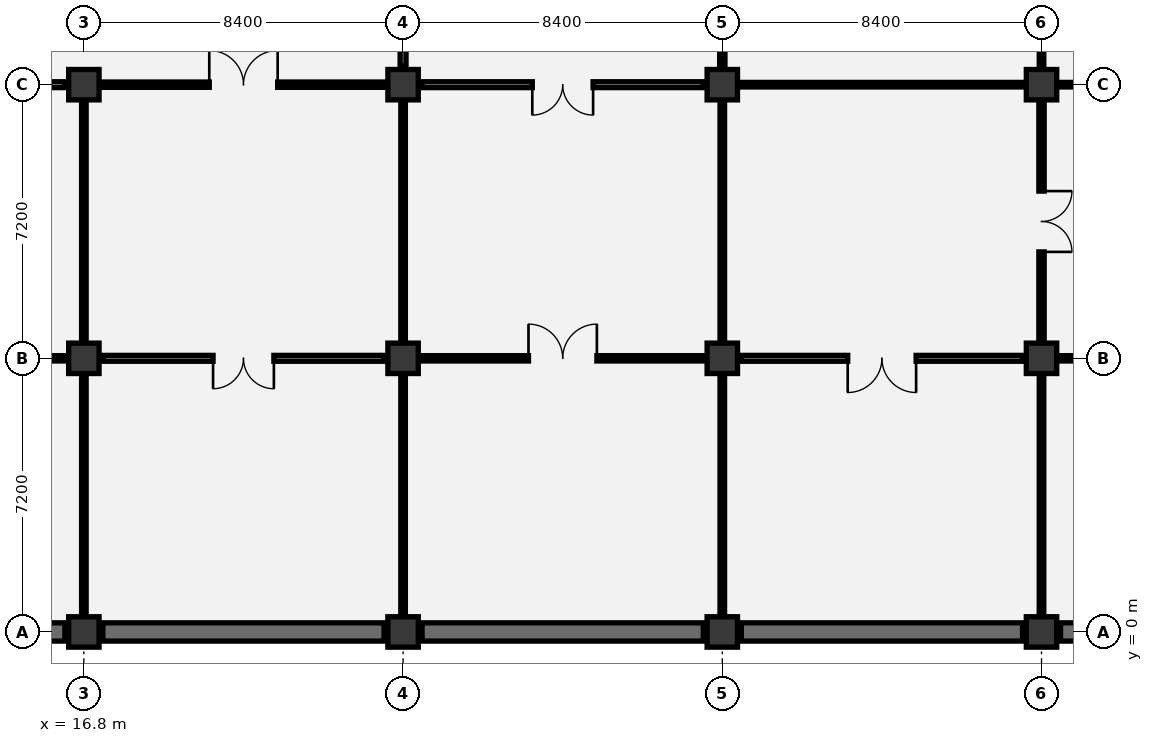
"""IFC4 building model, lengths in metres.
Left out: names, types, materials, properties, quantities, classifications, styles, units other than length and angle.
Written with IfcOpenShell. Run it as: python <this file> out.ifc"""

import sys

from ifc_helpers import new_model, si_unit, direction, frame, frame_2d, origin, origin_2d, place, context, subcontext, project, spatial, rectangle, extrude, element, fill, save


model = new_model("IFC4")
c1 = context("Model", 3, precision=1e-05, world=origin(), true_north=direction((0.0, 1.0)))
c2 = subcontext(c1, "Body", "Model", "MODEL_VIEW")
j1 = project(units=[si_unit("LENGTHUNIT", "METRE"), si_unit("PLANEANGLEUNIT", "RADIAN")], contexts=[c1])
p1 = place(None, origin())
s1 = spatial("IfcSite", under=j1, at=p1, CompositionType="ELEMENT")
p2 = place(p1, origin())
s2 = spatial("IfcBuilding", under=s1, at=p2, CompositionType="ELEMENT")
p3 = place(p2, frame((0.0, 0.0, -4.8)))
s3 = spatial("IfcBuildingStorey", under=s2, at=p3, CompositionType="ELEMENT", Elevation=-4.8)
for number, where, z_axis, x_axis in (
    (1, (16.8, 0.0, 0.0), (0.0, 0.0, 1.0), (1.0, 0.0, 0.0)),
    (2, (16.8, 7.2, 0.0), (0.0, 0.0, 1.0), (1.0, 0.0, 0.0)),
    (3, (16.8, 14.4, 0.0), (0.0, 0.0, 1.0), (1.0, 0.0, 0.0)),
    (4, (25.2, 0.0, 0.0), (0.0, 0.0, 1.0), (1.0, 0.0, 0.0)),
    (5, (25.2, 7.2, 0.0), (0.0, 0.0, 1.0), (1.0, 0.0, 0.0)),
    (6, (25.2, 14.4, 0.0), (0.0, 0.0, 1.0), (1.0, 0.0, 0.0)),
    (7, (33.6, 0.0, 0.0), (0.0, 0.0, 1.0), (1.0, 0.0, 0.0)),
    (8, (33.6, 7.2, 0.0), (0.0, 0.0, 1.0), (1.0, 0.0, 0.0)),
    (9, (33.6, 14.4, 0.0), (0.0, 0.0, 1.0), (1.0, 0.0, 0.0)),
    (10, (42.0, 0.0, 0.0), (0.0, 0.0, 1.0), (1.0, 0.0, 0.0)),
    (11, (42.0, 7.2, 0.0), (0.0, 0.0, 1.0), (1.0, 0.0, 0.0)),
    (12, (42.0, 14.4, 0.0), (0.0, 0.0, 1.0), (1.0, 0.0, 0.0)),
):
    element("IfcColumn", number, at=place(p3, frame(where, z_axis=z_axis, x_axis=x_axis)), inside=s3, PredefinedType="COLUMN", context=c2, shape_type="SweptSolid", body=[
        extrude(rectangle(XDim=0.8, YDim=0.8, at=origin_2d()), origin(), (0.0, 0.0, 1.0), 4.8),
    ])
p4 = place(p3, frame((8.9, 0.0, 0.0), z_axis=(0.0, 0.0, 1.0), x_axis=(1.0, 0.0, 0.0)))
e13 = element("IfcWall", 13, at=p4, inside=s3, PredefinedType="USERDEFINED", context=c2, shape_type="SweptSolid", body=[
    extrude(rectangle(XDim=7.4, YDim=0.48, at=frame_2d((3.7, 0.0))), origin(), (0.0, 0.0, 1.0), 4.45),
])
p5 = place(p3, frame((17.3, 0.0, 0.0), z_axis=(0.0, 0.0, 1.0), x_axis=(1.0, 0.0, 0.0)))
e14 = element("IfcWall", 14, at=p5, inside=s3, PredefinedType="USERDEFINED", context=c2, shape_type="SweptSolid", body=[
    extrude(rectangle(XDim=7.4, YDim=0.48, at=frame_2d((3.7, 0.0))), origin(), (0.0, 0.0, 1.0), 4.45),
])
p6 = place(p3, frame((25.7, 0.0, 0.0), z_axis=(0.0, 0.0, 1.0), x_axis=(1.0, 0.0, 0.0)))
e15 = element("IfcWall", 15, at=p6, inside=s3, PredefinedType="USERDEFINED", context=c2, shape_type="SweptSolid", body=[
    extrude(rectangle(XDim=7.4, YDim=0.48, at=frame_2d((3.7, 0.0))), origin(), (0.0, 0.0, 1.0), 4.45),
])
for number, where, z_axis, x_axis in (
    (16, (34.1, 0.0, 0.0), (0.0, 0.0, 1.0), (1.0, 0.0, 0.0)),
    (17, (42.5, 0.0, 0.0), (0.0, 0.0, 1.0), (1.0, 0.0, 0.0)),
):
    element("IfcWall", number, at=place(p3, frame(where, z_axis=z_axis, x_axis=x_axis)), inside=s3, PredefinedType="USERDEFINED", context=c2, shape_type="SweptSolid", body=[
        extrude(rectangle(XDim=7.4, YDim=0.48, at=frame_2d((3.7, 0.0))), origin(), (0.0, 0.0, 1.0), 4.45),
    ])
p7 = place(p3, frame((16.8, 0.5, 0.0), z_axis=(0.0, 0.0, 1.0), x_axis=(0.0, 1.0, 0.0)))
e18 = element("IfcWall", 18, at=p7, inside=s3, PredefinedType="PARTITIONING", context=c2, shape_type="SweptSolid", body=[
    extrude(rectangle(XDim=6.2, YDim=0.12, at=frame_2d((3.1, 0.0))), origin(), (0.0, 0.0, 1.0), 3.645),
])
p8 = place(p3, frame((8.9, 7.2, 0.0), z_axis=(0.0, 0.0, 1.0), x_axis=(1.0, 0.0, 0.0)))
e19 = element("IfcWall", 19, at=p8, inside=s3, PredefinedType="PARTITIONING", context=c2, shape_type="SweptSolid", body=[
    extrude(rectangle(XDim=7.4, YDim=0.14, at=frame_2d((3.7, 0.0))), origin(), (0.0, 0.0, 1.0), 3.545),
])
p9 = place(p8, frame((2.8, 0.0, 0.0)))
e20 = element("IfcOpeningElement", 20, at=p9, cuts=e19, PredefinedType="OPENING", context=c2, shape_type="SweptSolid", body=[
    extrude(rectangle(XDim=1.8, YDim=2.25, at=frame_2d((0.9, 1.125))), frame((0.0, 0.08, 0.0), z_axis=(0.0, -1.0, 0.0), x_axis=(1.0, 0.0, 0.0)), (0.0, 0.0, 1.0), 0.16),
])
p10 = place(p3, frame((16.8, 7.7, 0.0), z_axis=(0.0, 0.0, 1.0), x_axis=(0.0, 1.0, 0.0)))
e21 = element("IfcWall", 21, at=p10, inside=s3, PredefinedType="PARTITIONING", context=c2, shape_type="SweptSolid", body=[
    extrude(rectangle(XDim=6.2, YDim=0.12, at=frame_2d((3.1, 0.0))), origin(), (0.0, 0.0, 1.0), 3.645),
])
p11 = place(p3, frame((8.9, 14.4, 0.0), z_axis=(0.0, 0.0, 1.0), x_axis=(1.0, 0.0, 0.0)))
e22 = element("IfcWall", 22, at=p11, inside=s3, PredefinedType="PARTITIONING", context=c2, shape_type="SweptSolid", body=[
    extrude(rectangle(XDim=7.4, YDim=0.155, at=frame_2d((3.7, 0.0))), origin(), (0.0, 0.0, 1.0), 3.545),
])
p12 = place(p11, frame((2.9, 0.0, 0.0)))
e23 = element("IfcOpeningElement", 23, at=p12, cuts=e22, PredefinedType="OPENING", context=c2, shape_type="SweptSolid", body=[
    extrude(rectangle(XDim=1.6, YDim=2.2, at=frame_2d((0.8, 1.1))), frame((0.0, 0.087, 0.0), z_axis=(0.0, -1.0, 0.0), x_axis=(1.0, 0.0, 0.0)), (0.0, 0.0, 1.0), 0.175),
])
p13 = place(p3, frame((25.2, 0.5, 0.0), z_axis=(0.0, 0.0, 1.0), x_axis=(0.0, 1.0, 0.0)))
e24 = element("IfcWall", 24, at=p13, inside=s3, PredefinedType="PARTITIONING", context=c2, shape_type="SweptSolid", body=[
    extrude(rectangle(XDim=6.2, YDim=0.12, at=frame_2d((3.1, 0.0))), origin(), (0.0, 0.0, 1.0), 3.645),
])
p14 = place(p3, frame((17.3, 7.2, 0.0), z_axis=(0.0, 0.0, 1.0), x_axis=(1.0, 0.0, 0.0)))
e25 = element("IfcWall", 25, at=p14, inside=s3, PredefinedType="PARTITIONING", context=c2, shape_type="SweptSolid", body=[
    extrude(rectangle(XDim=7.4, YDim=0.155, at=frame_2d((3.7, 0.0))), origin(), (0.0, 0.0, 1.0), 3.545),
])
p15 = place(p14, frame((2.9, 0.0, 0.0)))
e26 = element("IfcOpeningElement", 26, at=p15, cuts=e25, PredefinedType="OPENING", context=c2, shape_type="SweptSolid", body=[
    extrude(rectangle(XDim=1.6, YDim=2.2, at=frame_2d((0.8, 1.1))), frame((0.0, 0.087, 0.0), z_axis=(0.0, -1.0, 0.0), x_axis=(1.0, 0.0, 0.0)), (0.0, 0.0, 1.0), 0.175),
])
p16 = place(p3, frame((25.2, 7.7, 0.0), z_axis=(0.0, 0.0, 1.0), x_axis=(0.0, 1.0, 0.0)))
e27 = element("IfcWall", 27, at=p16, inside=s3, PredefinedType="PARTITIONING", context=c2, shape_type="SweptSolid", body=[
    extrude(rectangle(XDim=6.2, YDim=0.12, at=frame_2d((3.1, 0.0))), origin(), (0.0, 0.0, 1.0), 3.645),
])
p17 = place(p3, frame((17.3, 14.4, 0.0), z_axis=(0.0, 0.0, 1.0), x_axis=(1.0, 0.0, 0.0)))
e28 = element("IfcWall", 28, at=p17, inside=s3, PredefinedType="PARTITIONING", context=c2, shape_type="SweptSolid", body=[
    extrude(rectangle(XDim=7.4, YDim=0.14, at=frame_2d((3.7, 0.0))), origin(), (0.0, 0.0, 1.0), 3.545),
])
p18 = place(p17, frame((2.8, 0.0, 0.0)))
e29 = element("IfcOpeningElement", 29, at=p18, cuts=e28, PredefinedType="OPENING", context=c2, shape_type="SweptSolid", body=[
    extrude(rectangle(XDim=1.8, YDim=2.25, at=frame_2d((0.9, 1.125))), frame((0.0, 0.08, 0.0), z_axis=(0.0, -1.0, 0.0), x_axis=(1.0, 0.0, 0.0)), (0.0, 0.0, 1.0), 0.16),
])
p19 = place(p3, frame((25.2, 14.9, 0.0), z_axis=(0.0, 0.0, 1.0), x_axis=(0.0, 1.0, 0.0)))
e30 = element("IfcWall", 30, at=p19, inside=s3, PredefinedType="PARTITIONING", context=c2, shape_type="SweptSolid", body=[
    extrude(rectangle(XDim=6.2, YDim=0.155, at=frame_2d((3.1, 0.0))), origin(), (0.0, 0.0, 1.0), 3.645),
])
p20 = place(p19, frame((2.3, 0.0, 0.0)))
e31 = element("IfcOpeningElement", 31, at=p20, cuts=e30, PredefinedType="OPENING", context=c2, shape_type="SweptSolid", body=[
    extrude(rectangle(XDim=1.6, YDim=2.2, at=frame_2d((0.8, 1.1))), frame((0.0, 0.087, 0.0), z_axis=(0.0, -1.0, 0.0), x_axis=(1.0, 0.0, 0.0)), (0.0, 0.0, 1.0), 0.175),
])
p21 = place(p3, frame((33.6, 0.5, 0.0), z_axis=(0.0, 0.0, 1.0), x_axis=(0.0, 1.0, 0.0)))
e32 = element("IfcWall", 32, at=p21, inside=s3, PredefinedType="PARTITIONING", context=c2, shape_type="SweptSolid", body=[
    extrude(rectangle(XDim=6.2, YDim=0.12, at=frame_2d((3.1, 0.0))), origin(), (0.0, 0.0, 1.0), 3.645),
])
p22 = place(p3, frame((25.7, 7.2, 0.0), z_axis=(0.0, 0.0, 1.0), x_axis=(1.0, 0.0, 0.0)))
e33 = element("IfcWall", 33, at=p22, inside=s3, PredefinedType="PARTITIONING", context=c2, shape_type="SweptSolid", body=[
    extrude(rectangle(XDim=7.4, YDim=0.14, at=frame_2d((3.7, 0.0))), origin(), (0.0, 0.0, 1.0), 3.545),
])
p23 = place(p22, frame((2.8, 0.0, 0.0)))
e34 = element("IfcOpeningElement", 34, at=p23, cuts=e33, PredefinedType="OPENING", context=c2, shape_type="SweptSolid", body=[
    extrude(rectangle(XDim=1.8, YDim=2.25, at=frame_2d((0.9, 1.125))), frame((0.0, 0.08, 0.0), z_axis=(0.0, -1.0, 0.0), x_axis=(1.0, 0.0, 0.0)), (0.0, 0.0, 1.0), 0.16),
])
p24 = place(p3, frame((33.6, 7.7, 0.0), z_axis=(0.0, 0.0, 1.0), x_axis=(0.0, 1.0, 0.0)))
e35 = element("IfcWall", 35, at=p24, inside=s3, PredefinedType="PARTITIONING", context=c2, shape_type="SweptSolid", body=[
    extrude(rectangle(XDim=6.2, YDim=0.12, at=frame_2d((3.1, 0.0))), origin(), (0.0, 0.0, 1.0), 3.645),
])
p25 = place(p3, frame((25.7, 14.4, 0.0), z_axis=(0.0, 0.0, 1.0), x_axis=(1.0, 0.0, 0.0)))
e36 = element("IfcWall", 36, at=p25, inside=s3, PredefinedType="PARTITIONING", context=c2, shape_type="SweptSolid", body=[
    extrude(rectangle(XDim=7.4, YDim=0.155, at=frame_2d((3.7, 0.0))), origin(), (0.0, 0.0, 1.0), 3.545),
])
p26 = place(p25, frame((2.9, 0.0, 0.0)))
e37 = element("IfcOpeningElement", 37, at=p26, cuts=e36, PredefinedType="OPENING", context=c2, shape_type="SweptSolid", body=[
    extrude(rectangle(XDim=1.6, YDim=2.2, at=frame_2d((0.8, 1.1))), frame((0.0, 0.087, 0.0), z_axis=(0.0, -1.0, 0.0), x_axis=(1.0, 0.0, 0.0)), (0.0, 0.0, 1.0), 0.175),
])
p27 = place(p3, frame((33.6, 14.9, 0.0), z_axis=(0.0, 0.0, 1.0), x_axis=(0.0, 1.0, 0.0)))
e38 = element("IfcWall", 38, at=p27, inside=s3, PredefinedType="PARTITIONING", context=c2, shape_type="SweptSolid", body=[
    extrude(rectangle(XDim=6.2, YDim=0.14, at=frame_2d((3.1, 0.0))), origin(), (0.0, 0.0, 1.0), 3.645),
])
p28 = place(p27, frame((2.2, 0.0, 0.0)))
e39 = element("IfcOpeningElement", 39, at=p28, cuts=e38, PredefinedType="OPENING", context=c2, shape_type="SweptSolid", body=[
    extrude(rectangle(XDim=1.8, YDim=2.25, at=frame_2d((0.9, 1.125))), frame((0.0, 0.08, 0.0), z_axis=(0.0, -1.0, 0.0), x_axis=(1.0, 0.0, 0.0)), (0.0, 0.0, 1.0), 0.16),
])
p29 = place(p3, frame((42.0, 0.5, 0.0), z_axis=(0.0, 0.0, 1.0), x_axis=(0.0, 1.0, 0.0)))
e40 = element("IfcWall", 40, at=p29, inside=s3, PredefinedType="PARTITIONING", context=c2, shape_type="SweptSolid", body=[
    extrude(rectangle(XDim=6.2, YDim=0.12, at=frame_2d((3.1, 0.0))), origin(), (0.0, 0.0, 1.0), 3.645),
])
p30 = place(p3, frame((34.1, 7.2, 0.0), z_axis=(0.0, 0.0, 1.0), x_axis=(1.0, 0.0, 0.0)))
e41 = element("IfcWall", 41, at=p30, inside=s3, PredefinedType="PARTITIONING", context=c2, shape_type="SweptSolid", body=[
    extrude(rectangle(XDim=7.4, YDim=0.155, at=frame_2d((3.7, 0.0))), origin(), (0.0, 0.0, 1.0), 3.545),
])
p31 = place(p30, frame((2.8, 0.0, 0.0)))
e42 = element("IfcOpeningElement", 42, at=p31, cuts=e41, PredefinedType="OPENING", context=c2, shape_type="SweptSolid", body=[
    extrude(rectangle(XDim=1.8, YDim=2.25, at=frame_2d((0.9, 1.125))), frame((0.0, 0.087, 0.0), z_axis=(0.0, -1.0, 0.0), x_axis=(1.0, 0.0, 0.0)), (0.0, 0.0, 1.0), 0.175),
])
p32 = place(p3, frame((42.0, 7.7, 0.0), z_axis=(0.0, 0.0, 1.0), x_axis=(0.0, 1.0, 0.0)))
e43 = element("IfcWall", 43, at=p32, inside=s3, PredefinedType="PARTITIONING", context=c2, shape_type="SweptSolid", body=[
    extrude(rectangle(XDim=6.2, YDim=0.14, at=frame_2d((3.1, 0.0))), origin(), (0.0, 0.0, 1.0), 3.645),
])
p33 = place(p32, frame((2.3, 0.0, 0.0)))
e44 = element("IfcOpeningElement", 44, at=p33, cuts=e43, PredefinedType="OPENING", context=c2, shape_type="SweptSolid", body=[
    extrude(rectangle(XDim=1.6, YDim=2.2, at=frame_2d((0.8, 1.1))), frame((0.0, 0.08, 0.0), z_axis=(0.0, -1.0, 0.0), x_axis=(1.0, 0.0, 0.0)), (0.0, 0.0, 1.0), 0.16),
])
p34 = place(p3, frame((34.1, 14.4, 0.0), z_axis=(0.0, 0.0, 1.0), x_axis=(1.0, 0.0, 0.0)))
e45 = element("IfcWall", 45, at=p34, inside=s3, PredefinedType="PARTITIONING", context=c2, shape_type="SweptSolid", body=[
    extrude(rectangle(XDim=7.4, YDim=0.12, at=frame_2d((3.7, 0.0))), origin(), (0.0, 0.0, 1.0), 3.545),
])
p35 = place(p3, frame((42.0, 14.9, 0.0), z_axis=(0.0, 0.0, 1.0), x_axis=(0.0, 1.0, 0.0)))
e46 = element("IfcWall", 46, at=p35, inside=s3, PredefinedType="PARTITIONING", context=c2, shape_type="SweptSolid", body=[
    extrude(rectangle(XDim=6.2, YDim=0.12, at=frame_2d((3.1, 0.0))), origin(), (0.0, 0.0, 1.0), 3.645),
])
p36 = place(p3, frame((42.5, 7.2, 0.0), z_axis=(0.0, 0.0, 1.0), x_axis=(1.0, 0.0, 0.0)))
e47 = element("IfcWall", 47, at=p36, inside=s3, PredefinedType="PARTITIONING", context=c2, shape_type="SweptSolid", body=[
    extrude(rectangle(XDim=7.4, YDim=0.14, at=frame_2d((3.7, 0.0))), origin(), (0.0, 0.0, 1.0), 3.545),
])
p37 = place(p36, frame((2.8, 0.0, 0.0)))
e48 = element("IfcOpeningElement", 48, at=p37, cuts=e47, PredefinedType="OPENING", context=c2, shape_type="SweptSolid", body=[
    extrude(rectangle(XDim=1.8, YDim=2.25, at=frame_2d((0.9, 1.125))), frame((0.0, 0.08, 0.0), z_axis=(0.0, -1.0, 0.0), x_axis=(1.0, 0.0, 0.0)), (0.0, 0.0, 1.0), 0.16),
])
p38 = place(p3, frame((42.5, 14.4, 0.0), z_axis=(0.0, 0.0, 1.0), x_axis=(1.0, 0.0, 0.0)))
e49 = element("IfcWall", 49, at=p38, inside=s3, PredefinedType="PARTITIONING", context=c2, shape_type="SweptSolid", body=[
    extrude(rectangle(XDim=7.4, YDim=0.12, at=frame_2d((3.7, 0.0))), origin(), (0.0, 0.0, 1.0), 3.545),
])
p39 = place(p15, frame((1.6, 0.0, 0.0), z_axis=(0.0, 0.0, 1.0), x_axis=(-1.0, 0.0, 0.0)))
e50 = element("IfcDoor", 50, at=p39, inside=s3, OperationType="DOUBLE_DOOR_SINGLE_SWING", PredefinedType="DOOR", context=c2, shape_type="SweptSolid", body=[
    extrude(rectangle(XDim=1.6, YDim=2.2, at=frame_2d((0.8, 1.1))), frame((0.0, 0.025, 0.0), z_axis=(0.0, -1.0, 0.0), x_axis=(1.0, 0.0, 0.0)), (0.0, 0.0, 1.0), 0.05),
])
fill(e26, e50)
p40 = place(p18, origin())
e51 = element("IfcDoor", 51, at=p40, inside=s3, OperationType="DOUBLE_DOOR_SINGLE_SWING", PredefinedType="DOOR", context=c2, shape_type="SweptSolid", body=[
    extrude(rectangle(XDim=1.8, YDim=2.25, at=frame_2d((0.9, 1.125))), frame((0.0, 0.025, 0.0), z_axis=(0.0, -1.0, 0.0), x_axis=(1.0, 0.0, 0.0)), (0.0, 0.0, 1.0), 0.05),
])
fill(e29, e51)
p41 = place(p23, origin())
e52 = element("IfcDoor", 52, at=p41, inside=s3, OperationType="DOUBLE_DOOR_SINGLE_SWING", PredefinedType="DOOR", context=c2, shape_type="SweptSolid", body=[
    extrude(rectangle(XDim=1.8, YDim=2.25, at=frame_2d((0.9, 1.125))), frame((0.0, 0.025, 0.0), z_axis=(0.0, -1.0, 0.0), x_axis=(1.0, 0.0, 0.0)), (0.0, 0.0, 1.0), 0.05),
])
fill(e34, e52)
p42 = place(p26, frame((1.6, 0.0, 0.0), z_axis=(0.0, 0.0, 1.0), x_axis=(-1.0, 0.0, 0.0)))
e53 = element("IfcDoor", 53, at=p42, inside=s3, OperationType="DOUBLE_DOOR_SINGLE_SWING", PredefinedType="DOOR", context=c2, shape_type="SweptSolid", body=[
    extrude(rectangle(XDim=1.6, YDim=2.2, at=frame_2d((0.8, 1.1))), frame((0.0, 0.025, 0.0), z_axis=(0.0, -1.0, 0.0), x_axis=(1.0, 0.0, 0.0)), (0.0, 0.0, 1.0), 0.05),
])
fill(e37, e53)
p43 = place(p31, frame((1.8, 0.0, 0.0), z_axis=(0.0, 0.0, 1.0), x_axis=(-1.0, 0.0, 0.0)))
e54 = element("IfcDoor", 54, at=p43, inside=s3, OperationType="DOUBLE_DOOR_SINGLE_SWING", PredefinedType="DOOR", context=c2, shape_type="SweptSolid", body=[
    extrude(rectangle(XDim=1.8, YDim=2.25, at=frame_2d((0.9, 1.125))), frame((0.0, 0.025, 0.0), z_axis=(0.0, -1.0, 0.0), x_axis=(1.0, 0.0, 0.0)), (0.0, 0.0, 1.0), 0.05),
])
fill(e42, e54)
p44 = place(p33, frame((1.6, 0.0, 0.0), z_axis=(0.0, 0.0, 1.0), x_axis=(-1.0, 0.0, 0.0)))
e55 = element("IfcDoor", 55, at=p44, inside=s3, OperationType="DOUBLE_DOOR_SINGLE_SWING", PredefinedType="DOOR", context=c2, shape_type="SweptSolid", body=[
    extrude(rectangle(XDim=1.6, YDim=2.2, at=frame_2d((0.8, 1.1))), frame((0.0, 0.025, 0.0), z_axis=(0.0, -1.0, 0.0), x_axis=(1.0, 0.0, 0.0)), (0.0, 0.0, 1.0), 0.05),
])
fill(e44, e55)
save(model, sys.argv[1])
